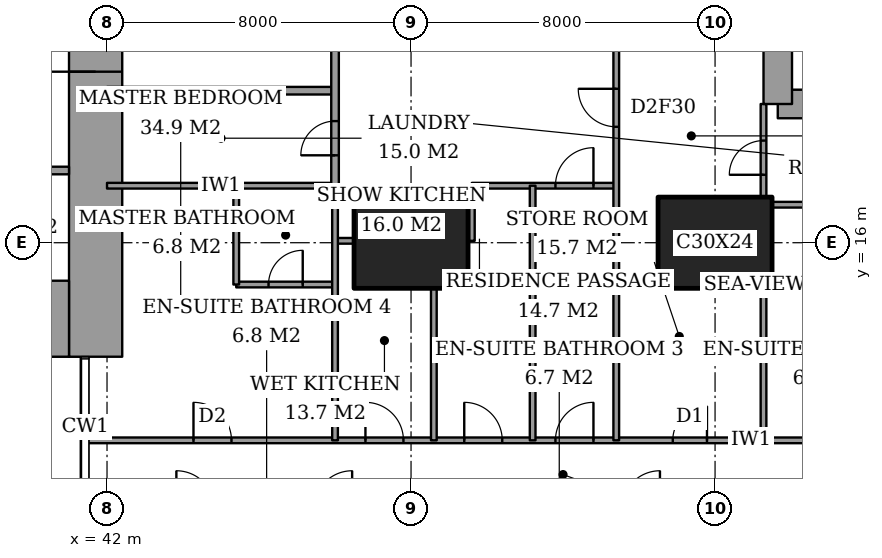
"""IFC4 building model, lengths in metres.
Left out: names, types, materials, properties, quantities, classifications, styles, units other than length and angle.
Written with IfcOpenShell. Run it as: python <this file> out.ifc"""

import sys

from ifc_helpers import new_model, si_unit, direction, frame, frame_2d, origin, origin_2d, place, context, subcontext, project, spatial, rectangle, extrude, element, fill, save


model = new_model("IFC4")
c1 = context("Model", 3, precision=1e-05, world=origin(), true_north=direction((0.0, 1.0)))
c2 = subcontext(c1, "Body", "Model", "MODEL_VIEW")
j1 = project(units=[si_unit("LENGTHUNIT", "METRE"), si_unit("PLANEANGLEUNIT", "RADIAN")], contexts=[c1])
p1 = place(None, origin())
s1 = spatial("IfcSite", under=j1, at=p1, CompositionType="ELEMENT")
p2 = place(p1, origin())
s2 = spatial("IfcBuilding", under=s1, at=p2, CompositionType="ELEMENT")
p3 = place(p2, frame((0.0, 0.0, 47.6)))
s3 = spatial("IfcBuildingStorey", under=s2, at=p3, CompositionType="ELEMENT", Elevation=47.6)
for number, where, z_axis, x_axis in (
    (1, (50.0, 16.0, 0.0), (0.0, 0.0, 1.0), (1.0, 0.0, 0.0)),
    (2, (58.0, 16.0, 0.0), (0.0, 0.0, 1.0), (1.0, 0.0, 0.0)),
):
    element("IfcColumn", number, at=place(p3, frame(where, z_axis=z_axis, x_axis=x_axis)), inside=s3, PredefinedType="COLUMN", context=c2, shape_type="SweptSolid", body=[
        extrude(rectangle(XDim=3.0, YDim=2.4, at=origin_2d()), origin(), (0.0, 0.0, 1.0), 3.6),
    ])
p4 = place(p3, frame((37.85, 14.0, 0.0), z_axis=(0.0, 0.0, 1.0), x_axis=(1.0, 0.0, 0.0)))
e3 = element("IfcWall", 3, at=p4, inside=s3, PredefinedType="SHEAR", context=c2, shape_type="SweptSolid", body=[
    extrude(rectangle(XDim=3.15, YDim=2.0, at=frame_2d((1.575, 0.0))), origin(), (0.0, 0.0, 1.0), 3.6),
])
p5 = place(p3, frame((41.7, 13.0, 0.0), z_axis=(0.0, 0.0, 1.0), x_axis=(0.0, 1.0, 0.0)))
e4 = element("IfcWall", 4, at=p5, inside=s3, PredefinedType="SHEAR", context=c2, shape_type="SweptSolid", body=[
    extrude(rectangle(XDim=11.85, YDim=1.4, at=frame_2d((5.925, 0.0))), origin(), (0.0, 0.0, 1.0), 3.6),
])
p6 = place(p5, frame((7.5, 0.0, 0.0)))
e5 = element("IfcOpeningElement", 5, at=p6, cuts=e4, PredefinedType="OPENING", context=c2, shape_type="SweptSolid", body=[
    extrude(rectangle(XDim=1.8, YDim=2.4, at=frame_2d((0.9, 1.2))), frame((0.0, 0.71, 0.0), z_axis=(0.0, -1.0, 0.0), x_axis=(1.0, 0.0, 0.0)), (0.0, 0.0, 1.0), 1.42),
])
p7 = place(p3, frame((59.65, 19.65, 0.0), z_axis=(0.0, 0.0, 1.0), x_axis=(1.0, 0.0, 0.0)))
e6 = element("IfcWall", 6, at=p7, inside=s3, PredefinedType="SHEAR", context=c2, shape_type="SweptSolid", body=[
    extrude(rectangle(XDim=4.45, YDim=0.75, at=frame_2d((2.225, 0.0))), origin(), (0.0, 0.0, 1.0), 3.6),
])
p8 = place(p3, frame((59.65, 28.35, 0.0), z_axis=(0.0, 0.0, 1.0), x_axis=(0.0, -1.0, 0.0)))
e7 = element("IfcWall", 7, at=p8, inside=s3, PredefinedType="SHEAR", context=c2, shape_type="SweptSolid", body=[
    extrude(rectangle(XDim=8.7, YDim=0.75, at=frame_2d((4.35, 0.0))), origin(), (0.0, 0.0, 1.0), 3.6),
])
p9 = place(p8, frame((0.975, 0.0, 0.0)))
e8 = element("IfcOpeningElement", 8, at=p9, cuts=e7, PredefinedType="OPENING", context=c2, shape_type="SweptSolid", body=[
    extrude(rectangle(XDim=1.0, YDim=2.1, at=frame_2d((0.5, 1.05))), frame((0.0, 0.385, 0.0), z_axis=(0.0, -1.0, 0.0), x_axis=(1.0, 0.0, 0.0)), (0.0, 0.0, 1.0), 0.77),
])
p10 = place(p3, frame((41.439, 10.8, 0.0), z_axis=(0.0, 0.0, 1.0), x_axis=(1.0, 0.0, 0.0)))
e9 = element("IfcWall", 9, at=p10, inside=s3, PredefinedType="PARTITIONING", context=c2, shape_type="SweptSolid", body=[
    extrude(rectangle(XDim=25.011, YDim=0.15, at=frame_2d((12.505, 0.0))), origin(), (0.0, 0.0, 1.0), 3.35),
])
p11 = place(p10, frame((12.361, 0.0, 0.0)))
e10 = element("IfcOpeningElement", 10, at=p11, cuts=e9, PredefinedType="OPENING", context=c2, shape_type="SweptSolid", body=[
    extrude(rectangle(XDim=1.0, YDim=2.1, at=frame_2d((0.5, 1.05))), frame((0.0, 0.085, 0.0), z_axis=(0.0, -1.0, 0.0), x_axis=(1.0, 0.0, 0.0)), (0.0, 0.0, 1.0), 0.17),
])
p12 = place(p10, frame((20.924, 0.0, 0.0)))
e11 = element("IfcOpeningElement", 11, at=p12, cuts=e9, PredefinedType="OPENING", context=c2, shape_type="SweptSolid", body=[
    extrude(rectangle(XDim=1.0, YDim=2.1, at=frame_2d((0.5, 1.05))), frame((0.0, 0.085, 0.0), z_axis=(0.0, -1.0, 0.0), x_axis=(1.0, 0.0, 0.0)), (0.0, 0.0, 1.0), 0.17),
])
p13 = place(p10, frame((15.448, 0.0, 0.0)))
e12 = element("IfcOpeningElement", 12, at=p13, cuts=e9, PredefinedType="OPENING", context=c2, shape_type="SweptSolid", body=[
    extrude(rectangle(XDim=0.9, YDim=2.1, at=frame_2d((0.45, 1.05))), frame((0.0, 0.085, 0.0), z_axis=(0.0, -1.0, 0.0), x_axis=(1.0, 0.0, 0.0)), (0.0, 0.0, 1.0), 0.17),
])
p14 = place(p10, frame((9.961, 0.0, 0.0)))
e13 = element("IfcOpeningElement", 13, at=p14, cuts=e9, PredefinedType="OPENING", context=c2, shape_type="SweptSolid", body=[
    extrude(rectangle(XDim=1.0, YDim=2.1, at=frame_2d((0.5, 1.05))), frame((0.0, 0.085, 0.0), z_axis=(0.0, -1.0, 0.0), x_axis=(1.0, 0.0, 0.0)), (0.0, 0.0, 1.0), 0.17),
])
p15 = place(p10, frame((7.361, 0.0, 0.0)))
e14 = element("IfcOpeningElement", 14, at=p15, cuts=e9, PredefinedType="OPENING", context=c2, shape_type="SweptSolid", body=[
    extrude(rectangle(XDim=1.0, YDim=2.1, at=frame_2d((0.5, 1.05))), frame((0.0, 0.085, 0.0), z_axis=(0.0, -1.0, 0.0), x_axis=(1.0, 0.0, 0.0)), (0.0, 0.0, 1.0), 0.17),
])
p16 = place(p10, frame((2.836, 0.0, 0.0)))
e15 = element("IfcOpeningElement", 15, at=p16, cuts=e9, PredefinedType="OPENING", context=c2, shape_type="SweptSolid", body=[
    extrude(rectangle(XDim=1.0, YDim=2.1, at=frame_2d((0.5, 1.05))), frame((0.0, 0.085, 0.0), z_axis=(0.0, -1.0, 0.0), x_axis=(1.0, 0.0, 0.0)), (0.0, 0.0, 1.0), 0.17),
])
p17 = place(p3, frame((45.4, 14.9, 0.0), z_axis=(0.0, 0.0, 1.0), x_axis=(1.0, 0.0, 0.0)))
e16 = element("IfcWall", 16, at=p17, inside=s3, PredefinedType="PARTITIONING", context=c2, shape_type="SweptSolid", body=[
    extrude(rectangle(XDim=2.6, YDim=0.15, at=frame_2d((1.3, 0.0))), origin(), (0.0, 0.0, 1.0), 3.35),
])
p18 = place(p17, frame((0.85, 0.0, 0.0)))
e17 = element("IfcOpeningElement", 17, at=p18, cuts=e16, PredefinedType="OPENING", context=c2, shape_type="SweptSolid", body=[
    extrude(rectangle(XDim=0.9, YDim=2.1, at=frame_2d((0.45, 1.05))), frame((0.0, 0.085, 0.0), z_axis=(0.0, -1.0, 0.0), x_axis=(1.0, 0.0, 0.0)), (0.0, 0.0, 1.0), 0.17),
])
p19 = place(p3, frame((55.4, 15.0, 0.0), z_axis=(0.0, 0.0, 1.0), x_axis=(1.0, 0.0, 0.0)))
e18 = element("IfcWall", 18, at=p19, inside=s3, PredefinedType="PARTITIONING", context=c2, shape_type="SweptSolid", body=[
    extrude(rectangle(XDim=1.1, YDim=0.15, at=frame_2d((0.55, 0.0))), origin(), (0.0, 0.0, 1.0), 3.35),
])
p20 = place(p3, frame((48.0, 16.05, 0.0), z_axis=(0.0, 0.0, 1.0), x_axis=(1.0, 0.0, 0.0)))
e19 = element("IfcWall", 19, at=p20, inside=s3, PredefinedType="PARTITIONING", context=c2, shape_type="SweptSolid", body=[
    extrude(rectangle(XDim=0.5, YDim=0.15, at=frame_2d((0.25, 0.0))), origin(), (0.0, 0.0, 1.0), 2.634),
])
p21 = place(p3, frame((59.5, 17.0, 0.0), z_axis=(0.0, 0.0, 1.0), x_axis=(1.0, 0.0, 0.0)))
e20 = element("IfcWall", 20, at=p21, inside=s3, PredefinedType="PARTITIONING", context=c2, shape_type="SweptSolid", body=[
    extrude(rectangle(XDim=5.15, YDim=0.15, at=frame_2d((2.575, 0.0))), origin(), (0.0, 0.0, 1.0), 3.35),
])
p22 = place(p3, frame((42.0, 17.5, 0.0), z_axis=(0.0, 0.0, 1.0), x_axis=(1.0, 0.0, 0.0)))
e21 = element("IfcWall", 21, at=p22, inside=s3, PredefinedType="PARTITIONING", context=c2, shape_type="SweptSolid", body=[
    extrude(rectangle(XDim=6.0, YDim=0.15, at=frame_2d((3.0, 0.0))), origin(), (0.0, 0.0, 1.0), 3.35),
])
p23 = place(p3, frame((51.6, 17.5, 0.0), z_axis=(0.0, 0.0, 1.0), x_axis=(1.0, 0.0, 0.0)))
e22 = element("IfcWall", 22, at=p23, inside=s3, PredefinedType="PARTITIONING", context=c2, shape_type="SweptSolid", body=[
    extrude(rectangle(XDim=3.8, YDim=0.15, at=frame_2d((1.9, 0.0))), origin(), (0.0, 0.0, 1.0), 3.35),
])
p24 = place(p23, frame((2.2, 0.0, 0.0)))
e23 = element("IfcOpeningElement", 23, at=p24, cuts=e22, PredefinedType="OPENING", context=c2, shape_type="SweptSolid", body=[
    extrude(rectangle(XDim=1.0, YDim=2.1, at=frame_2d((0.5, 1.05))), frame((0.0, 0.085, 0.0), z_axis=(0.0, -1.0, 0.0), x_axis=(1.0, 0.0, 0.0)), (0.0, 0.0, 1.0), 0.17),
])
p25 = place(p3, frame((42.0, 20.0, 0.0), z_axis=(0.0, 0.0, 1.0), x_axis=(1.0, 0.0, 0.0)))
e24 = element("IfcWall", 24, at=p25, inside=s3, PredefinedType="PARTITIONING", context=c2, shape_type="SweptSolid", body=[
    extrude(rectangle(XDim=6.0, YDim=0.2, at=frame_2d((3.0, 0.0))), origin(), (0.0, 0.0, 1.0), 3.35),
])
p26 = place(p3, frame((45.4, 14.9, 0.0), z_axis=(0.0, 0.0, 1.0), x_axis=(0.0, 1.0, 0.0)))
e25 = element("IfcWall", 25, at=p26, inside=s3, PredefinedType="PARTITIONING", context=c2, shape_type="SweptSolid", body=[
    extrude(rectangle(XDim=2.6, YDim=0.15, at=frame_2d((1.3, 0.0))), origin(), (0.0, 0.0, 1.0), 3.35),
])
p27 = place(p3, frame((48.0, 17.5, 0.0), z_axis=(0.0, 0.0, 1.0), x_axis=(0.0, 1.0, 0.0)))
e26 = element("IfcWall", 26, at=p27, inside=s3, PredefinedType="PARTITIONING", context=c2, shape_type="SweptSolid", body=[
    extrude(rectangle(XDim=6.5, YDim=0.2, at=frame_2d((3.25, 0.0))), origin(), (0.0, 0.0, 1.0), 3.35),
])
p28 = place(p27, frame((3.9, 0.0, 0.0)))
e27 = element("IfcOpeningElement", 27, at=p28, cuts=e26, PredefinedType="OPENING", context=c2, shape_type="SweptSolid", body=[
    extrude(rectangle(XDim=1.2, YDim=2.4, at=frame_2d((0.6, 1.2))), frame((0.0, 0.11, 0.0), z_axis=(0.0, -1.0, 0.0), x_axis=(1.0, 0.0, 0.0)), (0.0, 0.0, 1.0), 0.22),
])
p29 = place(p27, frame((0.8, 0.0, 0.0)))
e28 = element("IfcOpeningElement", 28, at=p29, cuts=e26, PredefinedType="OPENING", context=c2, shape_type="SweptSolid", body=[
    extrude(rectangle(XDim=0.9, YDim=2.1, at=frame_2d((0.45, 1.05))), frame((0.0, 0.11, 0.0), z_axis=(0.0, -1.0, 0.0), x_axis=(1.0, 0.0, 0.0)), (0.0, 0.0, 1.0), 0.22),
])
p30 = place(p3, frame((48.0, 10.8, 0.0), z_axis=(0.0, 0.0, 1.0), x_axis=(0.0, 1.0, 0.0)))
e29 = element("IfcWall", 29, at=p30, inside=s3, PredefinedType="PARTITIONING", context=c2, shape_type="SweptSolid", body=[
    extrude(rectangle(XDim=6.7, YDim=0.15, at=frame_2d((3.35, 0.0))), origin(), (0.0, 0.0, 1.0), 3.35),
])
p31 = place(p3, frame((50.6, 10.8, 0.0), z_axis=(0.0, 0.0, 1.0), x_axis=(0.0, 1.0, 0.0)))
e30 = element("IfcWall", 30, at=p31, inside=s3, PredefinedType="PARTITIONING", context=c2, shape_type="SweptSolid", body=[
    extrude(rectangle(XDim=4.0, YDim=0.15, at=frame_2d((2.0, 0.0))), origin(), (0.0, 0.0, 1.0), 3.35),
])
p32 = place(p3, frame((51.6, 16.05, 0.0), z_axis=(0.0, 0.0, 1.0), x_axis=(0.0, 1.0, 0.0)))
e31 = element("IfcWall", 31, at=p32, inside=s3, PredefinedType="PARTITIONING", context=c2, shape_type="SweptSolid", body=[
    extrude(rectangle(XDim=1.45, YDim=0.15, at=frame_2d((0.725, 0.0))), origin(), (0.0, 0.0, 1.0), 3.35),
])
p33 = place(p3, frame((53.2, 10.8, 0.0), z_axis=(0.0, 0.0, 1.0), x_axis=(0.0, 1.0, 0.0)))
e32 = element("IfcWall", 32, at=p33, inside=s3, PredefinedType="PARTITIONING", context=c2, shape_type="SweptSolid", body=[
    extrude(rectangle(XDim=6.7, YDim=0.15, at=frame_2d((3.35, 0.0))), origin(), (0.0, 0.0, 1.0), 3.35),
])
p34 = place(p3, frame((55.4, 10.8, 0.0), z_axis=(0.0, 0.0, 1.0), x_axis=(0.0, 1.0, 0.0)))
e33 = element("IfcWall", 33, at=p34, inside=s3, PredefinedType="PARTITIONING", context=c2, shape_type="SweptSolid", body=[
    extrude(rectangle(XDim=10.8, YDim=0.15, at=frame_2d((5.4, 0.0))), origin(), (0.0, 0.0, 1.0), 3.35),
])
p35 = place(p34, frame((8.25, 0.0, 0.0)))
e34 = element("IfcOpeningElement", 34, at=p35, cuts=e33, PredefinedType="OPENING", context=c2, shape_type="SweptSolid", body=[
    extrude(rectangle(XDim=1.0, YDim=2.1, at=frame_2d((0.5, 1.05))), frame((0.0, 0.085, 0.0), z_axis=(0.0, -1.0, 0.0), x_axis=(1.0, 0.0, 0.0)), (0.0, 0.0, 1.0), 0.17),
])
p36 = place(p3, frame((59.275, 10.8, 0.0), z_axis=(0.0, 0.0, 1.0), x_axis=(0.0, 1.0, 0.0)))
e35 = element("IfcWall", 35, at=p36, inside=s3, PredefinedType="PARTITIONING", context=c2, shape_type="SweptSolid", body=[
    extrude(rectangle(XDim=4.0, YDim=0.15, at=frame_2d((2.0, 0.0))), origin(), (0.0, 0.0, 1.0), 3.35),
])
p37 = place(p3, frame((59.275, 17.2, 0.0), z_axis=(0.0, 0.0, 1.0), x_axis=(0.0, 1.0, 0.0)))
e36 = element("IfcWall", 36, at=p37, inside=s3, PredefinedType="PARTITIONING", context=c2, shape_type="SweptSolid", body=[
    extrude(rectangle(XDim=2.45, YDim=0.15, at=frame_2d((1.225, 0.0))), origin(), (0.0, 0.0, 1.0), 3.35),
])
p38 = place(p37, frame((0.587, 0.0, 0.0)))
e37 = element("IfcOpeningElement", 37, at=p38, cuts=e36, PredefinedType="OPENING", context=c2, shape_type="SweptSolid", body=[
    extrude(rectangle(XDim=0.9, YDim=2.1, at=frame_2d((0.45, 1.05))), frame((0.0, 0.085, 0.0), z_axis=(0.0, -1.0, 0.0), x_axis=(1.0, 0.0, 0.0)), (0.0, 0.0, 1.0), 0.17),
])
p39 = place(p3, frame((28.3, 17.9, 0.0), z_axis=(0.0, 0.0, 1.0), x_axis=(1.0, 0.0, 0.0)))
e38 = element("IfcWall", 38, at=p39, inside=s3, PredefinedType="PARTITIONING", context=c2, shape_type="SweptSolid", body=[
    extrude(rectangle(XDim=12.7, YDim=0.2, at=frame_2d((6.35, 0.0))), origin(), (0.0, 0.0, 1.0), 3.6),
])
p40 = place(p39, frame((0.95, 0.0, 0.0)))
e39 = element("IfcOpeningElement", 39, at=p40, cuts=e38, PredefinedType="OPENING", context=c2, shape_type="SweptSolid", body=[
    extrude(rectangle(XDim=1.1, YDim=2.1, at=frame_2d((0.55, 1.05))), frame((0.0, 0.11, 0.0), z_axis=(0.0, -1.0, 0.0), x_axis=(1.0, 0.0, 0.0)), (0.0, 0.0, 1.0), 0.22),
])
p41 = place(p39, frame((4.15, 0.0, 0.0)))
e40 = element("IfcOpeningElement", 40, at=p41, cuts=e38, PredefinedType="OPENING", context=c2, shape_type="SweptSolid", body=[
    extrude(rectangle(XDim=1.1, YDim=2.1, at=frame_2d((0.55, 1.05))), frame((0.0, 0.11, 0.0), z_axis=(0.0, -1.0, 0.0), x_axis=(1.0, 0.0, 0.0)), (0.0, 0.0, 1.0), 0.22),
])
p42 = place(p39, frame((7.35, 0.0, 0.0)))
e41 = element("IfcOpeningElement", 41, at=p42, cuts=e38, PredefinedType="OPENING", context=c2, shape_type="SweptSolid", body=[
    extrude(rectangle(XDim=1.1, YDim=2.1, at=frame_2d((0.55, 1.05))), frame((0.0, 0.11, 0.0), z_axis=(0.0, -1.0, 0.0), x_axis=(1.0, 0.0, 0.0)), (0.0, 0.0, 1.0), 0.22),
])
p43 = place(p39, frame((10.6, 0.0, 0.0)))
e42 = element("IfcOpeningElement", 42, at=p43, cuts=e38, PredefinedType="OPENING", context=c2, shape_type="SweptSolid", body=[
    extrude(rectangle(XDim=1.2, YDim=2.1, at=frame_2d((0.6, 1.05))), frame((0.0, 0.11, 0.0), z_axis=(0.0, -1.0, 0.0), x_axis=(1.0, 0.0, 0.0)), (0.0, 0.0, 1.0), 0.22),
])
p44 = place(p11, origin())
e43 = element("IfcDoor", 43, at=p44, inside=s3, OperationType="SINGLE_SWING_LEFT", PredefinedType="DOOR", context=c2, shape_type="SweptSolid", body=[
    extrude(rectangle(XDim=1.0, YDim=2.1, at=frame_2d((0.5, 1.05))), frame((0.0, 0.025, 0.0), z_axis=(0.0, -1.0, 0.0), x_axis=(1.0, 0.0, 0.0)), (0.0, 0.0, 1.0), 0.05),
])
fill(e10, e43)
p45 = place(p38, origin())
e44 = element("IfcDoor", 44, at=p45, inside=s3, OperationType="SINGLE_SWING_RIGHT", PredefinedType="DOOR", context=c2, shape_type="SweptSolid", body=[
    extrude(rectangle(XDim=0.9, YDim=2.1, at=frame_2d((0.45, 1.05))), frame((0.0, 0.025, 0.0), z_axis=(0.0, -1.0, 0.0), x_axis=(1.0, 0.0, 0.0)), (0.0, 0.0, 1.0), 0.05),
])
fill(e37, e44)
p46 = place(p13, origin())
e45 = element("IfcDoor", 45, at=p46, inside=s3, OperationType="SINGLE_SWING_LEFT", PredefinedType="DOOR", context=c2, shape_type="SweptSolid", body=[
    extrude(rectangle(XDim=0.9, YDim=2.1, at=frame_2d((0.45, 1.05))), frame((0.0, 0.025, 0.0), z_axis=(0.0, -1.0, 0.0), x_axis=(1.0, 0.0, 0.0)), (0.0, 0.0, 1.0), 0.05),
])
fill(e12, e45)
p47 = place(p35, origin())
e46 = element("IfcDoor", 46, at=p47, inside=s3, OperationType="SINGLE_SWING_LEFT", PredefinedType="DOOR", context=c2, shape_type="SweptSolid", body=[
    extrude(rectangle(XDim=1.0, YDim=2.1, at=frame_2d((0.5, 1.05))), frame((0.0, 0.025, 0.0), z_axis=(0.0, -1.0, 0.0), x_axis=(1.0, 0.0, 0.0)), (0.0, 0.0, 1.0), 0.05),
])
fill(e34, e46)
p48 = place(p24, origin())
e47 = element("IfcDoor", 47, at=p48, inside=s3, OperationType="SINGLE_SWING_LEFT", PredefinedType="DOOR", context=c2, shape_type="SweptSolid", body=[
    extrude(rectangle(XDim=1.0, YDim=2.1, at=frame_2d((0.5, 1.05))), frame((0.0, 0.025, 0.0), z_axis=(0.0, -1.0, 0.0), x_axis=(1.0, 0.0, 0.0)), (0.0, 0.0, 1.0), 0.05),
])
fill(e23, e47)
p49 = place(p14, origin())
e48 = element("IfcDoor", 48, at=p49, inside=s3, OperationType="SINGLE_SWING_RIGHT", PredefinedType="DOOR", context=c2, shape_type="SweptSolid", body=[
    extrude(rectangle(XDim=1.0, YDim=2.1, at=frame_2d((0.5, 1.05))), frame((0.0, 0.025, 0.0), z_axis=(0.0, -1.0, 0.0), x_axis=(1.0, 0.0, 0.0)), (0.0, 0.0, 1.0), 0.05),
])
fill(e13, e48)
p50 = place(p15, origin())
e49 = element("IfcDoor", 49, at=p50, inside=s3, OperationType="SINGLE_SWING_RIGHT", PredefinedType="DOOR", context=c2, shape_type="SweptSolid", body=[
    extrude(rectangle(XDim=1.0, YDim=2.1, at=frame_2d((0.5, 1.05))), frame((0.0, 0.025, 0.0), z_axis=(0.0, -1.0, 0.0), x_axis=(1.0, 0.0, 0.0)), (0.0, 0.0, 1.0), 0.05),
])
fill(e14, e49)
p51 = place(p18, origin())
e50 = element("IfcDoor", 50, at=p51, inside=s3, OperationType="SINGLE_SWING_LEFT", PredefinedType="DOOR", context=c2, shape_type="SweptSolid", body=[
    extrude(rectangle(XDim=0.9, YDim=2.1, at=frame_2d((0.45, 1.05))), frame((0.0, 0.025, 0.0), z_axis=(0.0, -1.0, 0.0), x_axis=(1.0, 0.0, 0.0)), (0.0, 0.0, 1.0), 0.05),
])
fill(e17, e50)
p52 = place(p16, origin())
e51 = element("IfcDoor", 51, at=p52, inside=s3, OperationType="SINGLE_SWING_RIGHT", PredefinedType="DOOR", context=c2, shape_type="SweptSolid", body=[
    extrude(rectangle(XDim=1.0, YDim=2.1, at=frame_2d((0.5, 1.05))), frame((0.0, 0.025, 0.0), z_axis=(0.0, -1.0, 0.0), x_axis=(1.0, 0.0, 0.0)), (0.0, 0.0, 1.0), 0.05),
])
fill(e15, e51)
p53 = place(p29, origin())
e52 = element("IfcDoor", 52, at=p53, inside=s3, OperationType="SINGLE_SWING_RIGHT", PredefinedType="DOOR", context=c2, shape_type="SweptSolid", body=[
    extrude(rectangle(XDim=0.9, YDim=2.1, at=frame_2d((0.45, 1.05))), frame((0.0, 0.025, 0.0), z_axis=(0.0, -1.0, 0.0), x_axis=(1.0, 0.0, 0.0)), (0.0, 0.0, 1.0), 0.05),
])
fill(e28, e52)
p54 = place(p6, origin())
e53 = element("IfcDoor", 53, at=p54, inside=s3, OperationType="DOUBLE_DOOR_DOUBLE_SWING", PredefinedType="DOOR", context=c2, shape_type="SweptSolid", body=[
    extrude(rectangle(XDim=1.8, YDim=2.4, at=frame_2d((0.9, 1.2))), frame((0.0, 0.025, 0.0), z_axis=(0.0, -1.0, 0.0), x_axis=(1.0, 0.0, 0.0)), (0.0, 0.0, 1.0), 0.05),
])
fill(e5, e53)
save(model, sys.argv[1])
